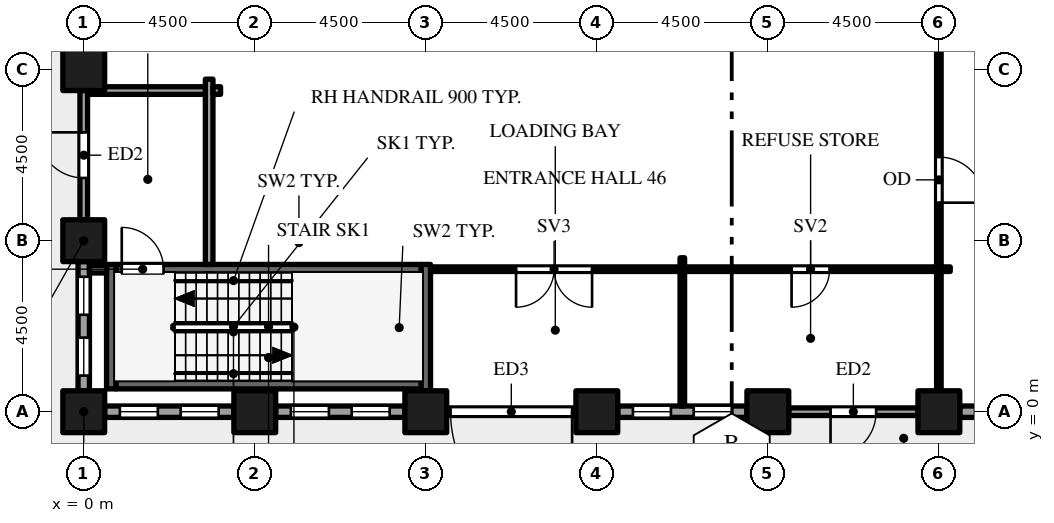
"""IFC4 building model, lengths in metres.
Left out: names, types, materials, properties, quantities, classifications, styles, units other than length and angle.
Written with IfcOpenShell. Run it as: python <this file> out.ifc"""

import sys

from ifc_helpers import new_model, si_unit, direction, frame, frame_2d, origin, origin_2d, place, context, subcontext, project, spatial, rectangle, hollow_rectangle, extrude, element, fill, save


model = new_model("IFC4")
c1 = context("Model", 3, precision=1e-05, world=origin(), true_north=direction((0.0, 1.0)))
c2 = subcontext(c1, "Body", "Model", "MODEL_VIEW")
j1 = project(units=[si_unit("LENGTHUNIT", "METRE"), si_unit("PLANEANGLEUNIT", "RADIAN")], contexts=[c1])
p1 = place(None, origin())
s1 = spatial("IfcSite", under=j1, at=p1, CompositionType="ELEMENT")
p2 = place(p1, origin())
s2 = spatial("IfcBuilding", under=s1, at=p2, CompositionType="ELEMENT")
p3 = place(p2, origin())
s3 = spatial("IfcBuildingStorey", under=s2, at=p3, CompositionType="ELEMENT", Elevation=0.0)
for number, where, z_axis, x_axis in (
    (1, (0.0, 0.0, -0.3), (0.0, 0.0, 1.0), (1.0, 0.0, 0.0)),
    (2, (0.0, 4.5, -0.3), (0.0, 0.0, 1.0), (1.0, 0.0, 0.0)),
    (3, (0.0, 9.0, -0.3), (0.0, 0.0, 1.0), (1.0, 0.0, 0.0)),
    (4, (4.5, 0.0, -0.3), (0.0, 0.0, 1.0), (1.0, 0.0, 0.0)),
    (5, (9.0, 0.0, -0.3), (0.0, 0.0, 1.0), (1.0, 0.0, 0.0)),
    (6, (13.5, 0.0, -0.3), (0.0, 0.0, 1.0), (1.0, 0.0, 0.0)),
    (7, (18.0, 0.0, -0.3), (0.0, 0.0, 1.0), (1.0, 0.0, 0.0)),
    (8, (22.5, 0.0, -0.3), (0.0, 0.0, 1.0), (1.0, 0.0, 0.0)),
):
    element("IfcColumn", number, at=place(p3, frame(where, z_axis=z_axis, x_axis=x_axis)), inside=s3, PredefinedType="COLUMN", context=c2, shape_type="SweptSolid", body=[
        extrude(hollow_rectangle(XDim=1.1, YDim=1.1, WallThickness=0.06, at=origin_2d()), origin(), (0.0, 0.0, 1.0), 8.05),
    ])
p4 = place(p3, frame((0.0, 5.05, 0.0), z_axis=(0.0, 0.0, 1.0), x_axis=(0.0, 1.0, 0.0)))
e9 = element("IfcWall", 9, at=p4, inside=s3, PredefinedType="STANDARD", context=c2, shape_type="SweptSolid", body=[
    extrude(rectangle(XDim=3.4, YDim=0.2, at=frame_2d((1.7, 0.0))), origin(), (0.0, 0.0, 1.0), 7.036),
])
p5 = place(p4, frame((1.1, 0.0, 0.0)))
e10 = element("IfcOpeningElement", 10, at=p5, cuts=e9, PredefinedType="OPENING", context=c2, shape_type="SweptSolid", body=[
    extrude(rectangle(XDim=1.2, YDim=2.4, at=frame_2d((0.6, 1.2))), frame((0.0, 0.11, 0.0), z_axis=(0.0, -1.0, 0.0), x_axis=(1.0, 0.0, 0.0)), (0.0, 0.0, 1.0), 0.22),
])
p6 = place(p3, frame((0.0, 3.95, 0.0), z_axis=(0.0, 0.0, 1.0), x_axis=(0.0, -1.0, 0.0)))
e11 = element("IfcWall", 11, at=p6, inside=s3, PredefinedType="STANDARD", context=c2, shape_type="SweptSolid", body=[
    extrude(rectangle(XDim=3.4, YDim=0.3, at=frame_2d((1.7, 0.0))), origin(), (0.0, 0.0, 1.0), 7.036),
])
p7 = place(p6, frame((0.4, 0.0, 0.9)))
e12 = element("IfcOpeningElement", 12, at=p7, cuts=e11, PredefinedType="OPENING", context=c2, shape_type="SweptSolid", body=[
    extrude(rectangle(XDim=1.0, YDim=3.5, at=frame_2d((0.5, 1.75))), frame((0.0, 0.16, 0.0), z_axis=(0.0, -1.0, 0.0), x_axis=(1.0, 0.0, 0.0)), (0.0, 0.0, 1.0), 0.32),
])
p8 = place(p6, frame((2.0, 0.0, 0.9)))
e13 = element("IfcOpeningElement", 13, at=p8, cuts=e11, PredefinedType="OPENING", context=c2, shape_type="SweptSolid", body=[
    extrude(rectangle(XDim=1.0, YDim=3.5, at=frame_2d((0.5, 1.75))), frame((0.0, 0.16, 0.0), z_axis=(0.0, -1.0, 0.0), x_axis=(1.0, 0.0, 0.0)), (0.0, 0.0, 1.0), 0.32),
])
p9 = place(p3, frame((0.55, 0.0, 0.0), z_axis=(0.0, 0.0, 1.0), x_axis=(1.0, 0.0, 0.0)))
e14 = element("IfcWall", 14, at=p9, inside=s3, PredefinedType="STANDARD", context=c2, shape_type="SweptSolid", body=[
    extrude(rectangle(XDim=3.4, YDim=0.3, at=frame_2d((1.7, 0.0))), origin(), (0.0, 0.0, 1.0), 7.036),
])
p10 = place(p9, frame((0.4, 0.0, 0.9)))
e15 = element("IfcOpeningElement", 15, at=p10, cuts=e14, PredefinedType="OPENING", context=c2, shape_type="SweptSolid", body=[
    extrude(rectangle(XDim=1.0, YDim=3.5, at=frame_2d((0.5, 1.75))), frame((0.0, 0.16, 0.0), z_axis=(0.0, -1.0, 0.0), x_axis=(1.0, 0.0, 0.0)), (0.0, 0.0, 1.0), 0.32),
])
p11 = place(p9, frame((2.0, 0.0, 0.9)))
e16 = element("IfcOpeningElement", 16, at=p11, cuts=e14, PredefinedType="OPENING", context=c2, shape_type="SweptSolid", body=[
    extrude(rectangle(XDim=1.0, YDim=3.5, at=frame_2d((0.5, 1.75))), frame((0.0, 0.16, 0.0), z_axis=(0.0, -1.0, 0.0), x_axis=(1.0, 0.0, 0.0)), (0.0, 0.0, 1.0), 0.32),
])
p12 = place(p3, frame((5.05, 0.0, 0.0), z_axis=(0.0, 0.0, 1.0), x_axis=(1.0, 0.0, 0.0)))
e17 = element("IfcWall", 17, at=p12, inside=s3, PredefinedType="STANDARD", context=c2, shape_type="SweptSolid", body=[
    extrude(rectangle(XDim=3.4, YDim=0.3, at=frame_2d((1.7, 0.0))), origin(), (0.0, 0.0, 1.0), 7.036),
])
p13 = place(p12, frame((0.4, 0.0, 0.9)))
e18 = element("IfcOpeningElement", 18, at=p13, cuts=e17, PredefinedType="OPENING", context=c2, shape_type="SweptSolid", body=[
    extrude(rectangle(XDim=1.0, YDim=3.5, at=frame_2d((0.5, 1.75))), frame((0.0, 0.16, 0.0), z_axis=(0.0, -1.0, 0.0), x_axis=(1.0, 0.0, 0.0)), (0.0, 0.0, 1.0), 0.32),
])
p14 = place(p12, frame((2.0, 0.0, 0.9)))
e19 = element("IfcOpeningElement", 19, at=p14, cuts=e17, PredefinedType="OPENING", context=c2, shape_type="SweptSolid", body=[
    extrude(rectangle(XDim=1.0, YDim=3.5, at=frame_2d((0.5, 1.75))), frame((0.0, 0.16, 0.0), z_axis=(0.0, -1.0, 0.0), x_axis=(1.0, 0.0, 0.0)), (0.0, 0.0, 1.0), 0.32),
])
p15 = place(p3, frame((12.95, 0.0, 0.0), z_axis=(0.0, 0.0, 1.0), x_axis=(-1.0, 0.0, 0.0)))
e20 = element("IfcWall", 20, at=p15, inside=s3, PredefinedType="STANDARD", context=c2, shape_type="SweptSolid", body=[
    extrude(rectangle(XDim=3.4, YDim=0.2, at=frame_2d((1.7, 0.0))), origin(), (0.0, 0.0, 1.0), 7.036),
])
p16 = place(p15, frame((0.1, 0.0, 0.0)))
e21 = element("IfcOpeningElement", 21, at=p16, cuts=e20, PredefinedType="OPENING", context=c2, shape_type="SweptSolid", body=[
    extrude(rectangle(XDim=3.2, YDim=4.5, at=frame_2d((1.6, 2.25))), frame((0.0, 0.11, 0.0), z_axis=(0.0, -1.0, 0.0), x_axis=(1.0, 0.0, 0.0)), (0.0, 0.0, 1.0), 0.22),
])
p17 = place(p3, frame((14.05, 0.0, 0.0), z_axis=(0.0, 0.0, 1.0), x_axis=(1.0, 0.0, 0.0)))
e22 = element("IfcWall", 22, at=p17, inside=s3, PredefinedType="STANDARD", context=c2, shape_type="SweptSolid", body=[
    extrude(rectangle(XDim=3.4, YDim=0.3, at=frame_2d((1.7, 0.0))), origin(), (0.0, 0.0, 1.0), 7.036),
])
p18 = place(p17, frame((0.4, 0.0, 0.9)))
e23 = element("IfcOpeningElement", 23, at=p18, cuts=e22, PredefinedType="OPENING", context=c2, shape_type="SweptSolid", body=[
    extrude(rectangle(XDim=1.0, YDim=3.5, at=frame_2d((0.5, 1.75))), frame((0.0, 0.16, 0.0), z_axis=(0.0, -1.0, 0.0), x_axis=(1.0, 0.0, 0.0)), (0.0, 0.0, 1.0), 0.32),
])
p19 = place(p17, frame((2.0, 0.0, 0.9)))
e24 = element("IfcOpeningElement", 24, at=p19, cuts=e22, PredefinedType="OPENING", context=c2, shape_type="SweptSolid", body=[
    extrude(rectangle(XDim=1.0, YDim=3.5, at=frame_2d((0.5, 1.75))), frame((0.0, 0.16, 0.0), z_axis=(0.0, -1.0, 0.0), x_axis=(1.0, 0.0, 0.0)), (0.0, 0.0, 1.0), 0.32),
])
p20 = place(p3, frame((21.95, 0.0, 0.0), z_axis=(0.0, 0.0, 1.0), x_axis=(-1.0, 0.0, 0.0)))
e25 = element("IfcWall", 25, at=p20, inside=s3, PredefinedType="STANDARD", context=c2, shape_type="SweptSolid", body=[
    extrude(rectangle(XDim=3.4, YDim=0.2, at=frame_2d((1.7, 0.0))), origin(), (0.0, 0.0, 1.0), 7.036),
])
p21 = place(p20, frame((1.1, 0.0, 0.0)))
e26 = element("IfcOpeningElement", 26, at=p21, cuts=e25, PredefinedType="OPENING", context=c2, shape_type="SweptSolid", body=[
    extrude(rectangle(XDim=1.2, YDim=2.4, at=frame_2d((0.6, 1.2))), frame((0.0, 0.11, 0.0), z_axis=(0.0, -1.0, 0.0), x_axis=(1.0, 0.0, 0.0)), (0.0, 0.0, 1.0), 0.22),
])
p22 = place(p3, frame((23.05, 0.0, 0.0), z_axis=(0.0, 0.0, 1.0), x_axis=(1.0, 0.0, 0.0)))
e27 = element("IfcWall", 27, at=p22, inside=s3, PredefinedType="STANDARD", context=c2, shape_type="SweptSolid", body=[
    extrude(rectangle(XDim=3.4, YDim=0.3, at=frame_2d((1.7, 0.0))), origin(), (0.0, 0.0, 1.0), 7.036),
])
p23 = place(p22, frame((0.4, 0.0, 0.9)))
e28 = element("IfcOpeningElement", 28, at=p23, cuts=e27, PredefinedType="OPENING", context=c2, shape_type="SweptSolid", body=[
    extrude(rectangle(XDim=1.0, YDim=3.5, at=frame_2d((0.5, 1.75))), frame((0.0, 0.16, 0.0), z_axis=(0.0, -1.0, 0.0), x_axis=(1.0, 0.0, 0.0)), (0.0, 0.0, 1.0), 0.32),
])
p24 = place(p22, frame((2.0, 0.0, 0.9)))
e29 = element("IfcOpeningElement", 29, at=p24, cuts=e27, PredefinedType="OPENING", context=c2, shape_type="SweptSolid", body=[
    extrude(rectangle(XDim=1.0, YDim=3.5, at=frame_2d((0.5, 1.75))), frame((0.0, 0.16, 0.0), z_axis=(0.0, -1.0, 0.0), x_axis=(1.0, 0.0, 0.0)), (0.0, 0.0, 1.0), 0.32),
])
p25 = place(p3, frame((0.725, 0.6, 0.0), z_axis=(0.0, 0.0, 1.0), x_axis=(0.0, 1.0, 0.0)))
e30 = element("IfcWall", 30, at=p25, inside=s3, PredefinedType="SHEAR", context=c2, shape_type="SweptSolid", body=[
    extrude(rectangle(XDim=3.275, YDim=0.25, at=frame_2d((1.637, 0.0))), origin(), (0.0, 0.0, 1.0), 7.75),
])
p26 = place(p3, frame((3.3, 3.45, 0.0), z_axis=(0.0, 0.0, 1.0), x_axis=(0.0, 1.0, 0.0)))
e31 = element("IfcWall", 31, at=p26, inside=s3, PredefinedType="PARTITIONING", context=c2, shape_type="SweptSolid", body=[
    extrude(rectangle(XDim=0.175, YDim=0.2, at=frame_2d((0.087, 0.0))), origin(), (0.0, 0.0, 1.0), 7.75),
])
p27 = place(p3, frame((3.3, 3.875, 0.0), z_axis=(0.0, 0.0, 1.0), x_axis=(0.0, 1.0, 0.0)))
e32 = element("IfcWall", 32, at=p27, inside=s3, PredefinedType="PARTITIONING", context=c2, shape_type="SweptSolid", body=[
    extrude(rectangle(XDim=4.875, YDim=0.2, at=frame_2d((2.438, 0.0))), origin(), (0.0, 0.0, 1.0), 7.75),
])
p28 = place(p3, frame((9.0, 0.15, 0.0), z_axis=(0.0, 0.0, 1.0), x_axis=(0.0, 1.0, 0.0)))
e33 = element("IfcWall", 33, at=p28, inside=s3, PredefinedType="PARTITIONING", context=c2, shape_type="SweptSolid", body=[
    extrude(rectangle(XDim=0.4, YDim=0.12, at=frame_2d((0.2, 0.0))), origin(), (0.0, 0.0, 1.0), 7.75),
])
p29 = place(p3, frame((9.0, 0.55, 0.0), z_axis=(0.0, 0.0, 1.0), x_axis=(0.0, 1.0, 0.0)))
e34 = element("IfcWall", 34, at=p29, inside=s3, PredefinedType="SHEAR", context=c2, shape_type="SweptSolid", body=[
    extrude(rectangle(XDim=3.325, YDim=0.25, at=frame_2d((1.663, 0.0))), origin(), (0.0, 0.0, 1.0), 7.75),
])
p30 = place(p3, frame((15.75, 0.15, 0.0), z_axis=(0.0, 0.0, 1.0), x_axis=(0.0, 1.0, 0.0)))
e35 = element("IfcWall", 35, at=p30, inside=s3, PredefinedType="PARTITIONING", context=c2, shape_type="SweptSolid", body=[
    extrude(rectangle(XDim=3.9, YDim=0.12, at=frame_2d((1.95, 0.0))), origin(), (0.0, 0.0, 1.0), 6.759),
])
p31 = place(p3, frame((22.5, 0.15, 0.0), z_axis=(0.0, 0.0, 1.0), x_axis=(0.0, 1.0, 0.0)))
e36 = element("IfcWall", 36, at=p31, inside=s3, PredefinedType="PARTITIONING", context=c2, shape_type="SweptSolid", body=[
    extrude(rectangle(XDim=32.85, YDim=0.12, at=frame_2d((16.425, 0.0))), origin(), (0.0, 0.0, 1.0), 6.759),
])
p32 = place(p31, frame((5.35, 0.0, 0.0)))
e37 = element("IfcOpeningElement", 37, at=p32, cuts=e36, PredefinedType="OPENING", context=c2, shape_type="SweptSolid", body=[
    extrude(rectangle(XDim=1.2, YDim=2.1, at=frame_2d((0.6, 1.05))), frame((0.0, 0.07, 0.0), z_axis=(0.0, -1.0, 0.0), x_axis=(1.0, 0.0, 0.0)), (0.0, 0.0, 1.0), 0.14),
])
p33 = place(p31, frame((16.155, 0.0, 0.0)))
e38 = element("IfcOpeningElement", 38, at=p33, cuts=e36, PredefinedType="OPENING", context=c2, shape_type="SweptSolid", body=[
    extrude(rectangle(XDim=1.2, YDim=2.1, at=frame_2d((0.6, 1.05))), frame((0.0, 0.07, 0.0), z_axis=(0.0, -1.0, 0.0), x_axis=(1.0, 0.0, 0.0)), (0.0, 0.0, 1.0), 0.14),
])
p34 = place(p31, frame((30.15, 0.0, 0.0)))
e39 = element("IfcOpeningElement", 39, at=p34, cuts=e36, PredefinedType="OPENING", context=c2, shape_type="SweptSolid", body=[
    extrude(rectangle(XDim=1.8, YDim=2.1, at=frame_2d((0.9, 1.05))), frame((0.0, 0.07, 0.0), z_axis=(0.0, -1.0, 0.0), x_axis=(1.0, 0.0, 0.0)), (0.0, 0.0, 1.0), 0.14),
])
p35 = place(p3, frame((0.85, 0.725, 0.0), z_axis=(0.0, 0.0, 1.0), x_axis=(1.0, 0.0, 0.0)))
e40 = element("IfcWall", 40, at=p35, inside=s3, PredefinedType="SHEAR", context=c2, shape_type="SweptSolid", body=[
    extrude(rectangle(XDim=8.025, YDim=0.25, at=frame_2d((4.012, 0.0))), origin(), (0.0, 0.0, 1.0), 7.75),
])
p36 = place(p3, frame((0.15, 3.75, 0.0), z_axis=(0.0, 0.0, 1.0), x_axis=(1.0, 0.0, 0.0)))
e41 = element("IfcWall", 41, at=p36, inside=s3, PredefinedType="PARTITIONING", context=c2, shape_type="SweptSolid", body=[
    extrude(rectangle(XDim=0.45, YDim=0.2, at=frame_2d((0.225, 0.0))), origin(), (0.0, 0.0, 1.0), 7.036),
])
p37 = place(p3, frame((0.85, 3.75, 0.0), z_axis=(0.0, 0.0, 1.0), x_axis=(1.0, 0.0, 0.0)))
e42 = element("IfcWall", 42, at=p37, inside=s3, PredefinedType="SHEAR", context=c2, shape_type="SweptSolid", body=[
    extrude(rectangle(XDim=8.025, YDim=0.25, at=frame_2d((4.012, 0.0))), origin(), (0.0, 0.0, 1.0), 7.75),
])
p38 = place(p37, frame((0.15, 0.0, 0.0)))
e43 = element("IfcOpeningElement", 43, at=p38, cuts=e42, PredefinedType="OPENING", context=c2, shape_type="SweptSolid", body=[
    extrude(rectangle(XDim=1.1, YDim=2.1, at=frame_2d((0.55, 1.05))), frame((0.0, 0.135, 0.0), z_axis=(0.0, -1.0, 0.0), x_axis=(1.0, 0.0, 0.0)), (0.0, 0.0, 1.0), 0.27),
])
p39 = place(p3, frame((9.125, 3.75, 0.0), z_axis=(0.0, 0.0, 1.0), x_axis=(1.0, 0.0, 0.0)))
e44 = element("IfcWall", 44, at=p39, inside=s3, PredefinedType="PARTITIONING", context=c2, shape_type="SweptSolid", body=[
    extrude(rectangle(XDim=6.565, YDim=0.12, at=frame_2d((3.282, 0.0))), origin(), (0.0, 0.0, 1.0), 6.759),
])
p40 = place(p39, frame((2.25, 0.0, 0.0)))
e45 = element("IfcOpeningElement", 45, at=p40, cuts=e44, PredefinedType="OPENING", context=c2, shape_type="SweptSolid", body=[
    extrude(rectangle(XDim=2.0, YDim=2.1, at=frame_2d((1.0, 1.05))), frame((0.0, 0.07, 0.0), z_axis=(0.0, -1.0, 0.0), x_axis=(1.0, 0.0, 0.0)), (0.0, 0.0, 1.0), 0.14),
])
p41 = place(p3, frame((15.81, 3.75, 0.0), z_axis=(0.0, 0.0, 1.0), x_axis=(1.0, 0.0, 0.0)))
e46 = element("IfcWall", 46, at=p41, inside=s3, PredefinedType="PARTITIONING", context=c2, shape_type="SweptSolid", body=[
    extrude(rectangle(XDim=6.63, YDim=0.12, at=frame_2d((3.315, 0.0))), origin(), (0.0, 0.0, 1.0), 6.759),
])
p42 = place(p41, frame((2.815, 0.0, 0.0)))
e47 = element("IfcOpeningElement", 47, at=p42, cuts=e46, PredefinedType="OPENING", context=c2, shape_type="SweptSolid", body=[
    extrude(rectangle(XDim=1.0, YDim=2.1, at=frame_2d((0.5, 1.05))), frame((0.0, 0.07, 0.0), z_axis=(0.0, -1.0, 0.0), x_axis=(1.0, 0.0, 0.0)), (0.0, 0.0, 1.0), 0.14),
])
p43 = place(p3, frame((22.56, 3.75, 0.0), z_axis=(0.0, 0.0, 1.0), x_axis=(1.0, 0.0, 0.0)))
e48 = element("IfcWall", 48, at=p43, inside=s3, PredefinedType="PARTITIONING", context=c2, shape_type="SweptSolid", body=[
    extrude(rectangle(XDim=0.24, YDim=0.12, at=frame_2d((0.12, 0.0))), origin(), (0.0, 0.0, 1.0), 6.759),
])
p44 = place(p3, frame((0.15, 8.45, 0.0), z_axis=(0.0, 0.0, 1.0), x_axis=(1.0, 0.0, 0.0)))
e49 = element("IfcWall", 49, at=p44, inside=s3, PredefinedType="PARTITIONING", context=c2, shape_type="SweptSolid", body=[
    extrude(rectangle(XDim=3.05, YDim=0.2, at=frame_2d((1.525, 0.0))), origin(), (0.0, 0.0, 1.0), 6.759),
])
p45 = place(p3, frame((3.4, 8.45, 0.0), z_axis=(0.0, 0.0, 1.0), x_axis=(1.0, 0.0, 0.0)))
e50 = element("IfcWall", 50, at=p45, inside=s3, PredefinedType="PARTITIONING", context=c2, shape_type="SweptSolid", body=[
    extrude(rectangle(XDim=0.2, YDim=0.2, at=frame_2d((0.1, 0.0))), origin(), (0.0, 0.0, 1.0), 7.75),
])
p46 = place(p5, origin())
e51 = element("IfcDoor", 51, at=p46, inside=s3, OperationType="SINGLE_SWING_RIGHT", PredefinedType="DOOR", context=c2, shape_type="SweptSolid", body=[
    extrude(rectangle(XDim=1.2, YDim=2.4, at=frame_2d((0.6, 1.2))), frame((0.0, 0.025, 0.0), z_axis=(0.0, -1.0, 0.0), x_axis=(1.0, 0.0, 0.0)), (0.0, 0.0, 1.0), 0.05),
])
fill(e10, e51)
p47 = place(p7, origin())
e52 = element("IfcWindow", 52, at=p47, inside=s3, PartitioningType="SINGLE_PANEL", PredefinedType="WINDOW", context=c2, shape_type="SweptSolid", body=[
    extrude(rectangle(XDim=1.0, YDim=3.5, at=frame_2d((0.5, 1.75))), frame((0.0, 0.03, 0.0), z_axis=(0.0, -1.0, 0.0), x_axis=(1.0, 0.0, 0.0)), (0.0, 0.0, 1.0), 0.06),
])
fill(e12, e52)
p48 = place(p8, origin())
e53 = element("IfcWindow", 53, at=p48, inside=s3, PartitioningType="SINGLE_PANEL", PredefinedType="WINDOW", context=c2, shape_type="SweptSolid", body=[
    extrude(rectangle(XDim=1.0, YDim=3.5, at=frame_2d((0.5, 1.75))), frame((0.0, 0.03, 0.0), z_axis=(0.0, -1.0, 0.0), x_axis=(1.0, 0.0, 0.0)), (0.0, 0.0, 1.0), 0.06),
])
fill(e13, e53)
p49 = place(p10, origin())
e54 = element("IfcWindow", 54, at=p49, inside=s3, PartitioningType="SINGLE_PANEL", PredefinedType="WINDOW", context=c2, shape_type="SweptSolid", body=[
    extrude(rectangle(XDim=1.0, YDim=3.5, at=frame_2d((0.5, 1.75))), frame((0.0, 0.03, 0.0), z_axis=(0.0, -1.0, 0.0), x_axis=(1.0, 0.0, 0.0)), (0.0, 0.0, 1.0), 0.06),
])
fill(e15, e54)
p50 = place(p11, origin())
e55 = element("IfcWindow", 55, at=p50, inside=s3, PartitioningType="SINGLE_PANEL", PredefinedType="WINDOW", context=c2, shape_type="SweptSolid", body=[
    extrude(rectangle(XDim=1.0, YDim=3.5, at=frame_2d((0.5, 1.75))), frame((0.0, 0.03, 0.0), z_axis=(0.0, -1.0, 0.0), x_axis=(1.0, 0.0, 0.0)), (0.0, 0.0, 1.0), 0.06),
])
fill(e16, e55)
p51 = place(p13, origin())
e56 = element("IfcWindow", 56, at=p51, inside=s3, PartitioningType="SINGLE_PANEL", PredefinedType="WINDOW", context=c2, shape_type="SweptSolid", body=[
    extrude(rectangle(XDim=1.0, YDim=3.5, at=frame_2d((0.5, 1.75))), frame((0.0, 0.03, 0.0), z_axis=(0.0, -1.0, 0.0), x_axis=(1.0, 0.0, 0.0)), (0.0, 0.0, 1.0), 0.06),
])
fill(e18, e56)
p52 = place(p14, origin())
e57 = element("IfcWindow", 57, at=p52, inside=s3, PartitioningType="SINGLE_PANEL", PredefinedType="WINDOW", context=c2, shape_type="SweptSolid", body=[
    extrude(rectangle(XDim=1.0, YDim=3.5, at=frame_2d((0.5, 1.75))), frame((0.0, 0.03, 0.0), z_axis=(0.0, -1.0, 0.0), x_axis=(1.0, 0.0, 0.0)), (0.0, 0.0, 1.0), 0.06),
])
fill(e19, e57)
p53 = place(p16, origin())
e58 = element("IfcDoor", 58, at=p53, inside=s3, OperationType="ROLLINGUP", PredefinedType="GATE", context=c2, shape_type="SweptSolid", body=[
    extrude(rectangle(XDim=3.2, YDim=4.5, at=frame_2d((1.6, 2.25))), frame((0.0, 0.025, 0.0), z_axis=(0.0, -1.0, 0.0), x_axis=(1.0, 0.0, 0.0)), (0.0, 0.0, 1.0), 0.05),
])
fill(e21, e58)
p54 = place(p18, origin())
e59 = element("IfcWindow", 59, at=p54, inside=s3, PartitioningType="SINGLE_PANEL", PredefinedType="WINDOW", context=c2, shape_type="SweptSolid", body=[
    extrude(rectangle(XDim=1.0, YDim=3.5, at=frame_2d((0.5, 1.75))), frame((0.0, 0.03, 0.0), z_axis=(0.0, -1.0, 0.0), x_axis=(1.0, 0.0, 0.0)), (0.0, 0.0, 1.0), 0.06),
])
fill(e23, e59)
p55 = place(p19, origin())
e60 = element("IfcWindow", 60, at=p55, inside=s3, PartitioningType="SINGLE_PANEL", PredefinedType="WINDOW", context=c2, shape_type="SweptSolid", body=[
    extrude(rectangle(XDim=1.0, YDim=3.5, at=frame_2d((0.5, 1.75))), frame((0.0, 0.03, 0.0), z_axis=(0.0, -1.0, 0.0), x_axis=(1.0, 0.0, 0.0)), (0.0, 0.0, 1.0), 0.06),
])
fill(e24, e60)
p56 = place(p21, origin())
e61 = element("IfcDoor", 61, at=p56, inside=s3, OperationType="SINGLE_SWING_RIGHT", PredefinedType="DOOR", context=c2, shape_type="SweptSolid", body=[
    extrude(rectangle(XDim=1.2, YDim=2.4, at=frame_2d((0.6, 1.2))), frame((0.0, 0.025, 0.0), z_axis=(0.0, -1.0, 0.0), x_axis=(1.0, 0.0, 0.0)), (0.0, 0.0, 1.0), 0.05),
])
fill(e26, e61)
p57 = place(p38, origin())
e62 = element("IfcDoor", 62, at=p57, inside=s3, OperationType="SINGLE_SWING_LEFT", PredefinedType="DOOR", context=c2, shape_type="SweptSolid", body=[
    extrude(rectangle(XDim=1.1, YDim=2.1, at=frame_2d((0.55, 1.05))), frame((0.0, 0.025, 0.0), z_axis=(0.0, -1.0, 0.0), x_axis=(1.0, 0.0, 0.0)), (0.0, 0.0, 1.0), 0.05),
])
fill(e43, e62)
p58 = place(p40, origin())
e63 = element("IfcDoor", 63, at=p58, inside=s3, OperationType="DOUBLE_DOOR_SINGLE_SWING", PredefinedType="DOOR", context=c2, shape_type="SweptSolid", body=[
    extrude(rectangle(XDim=2.0, YDim=2.1, at=frame_2d((1.0, 1.05))), frame((0.0, 0.025, 0.0), z_axis=(0.0, -1.0, 0.0), x_axis=(1.0, 0.0, 0.0)), (0.0, 0.0, 1.0), 0.05),
])
fill(e45, e63)
p59 = place(p42, origin())
e64 = element("IfcDoor", 64, at=p59, inside=s3, OperationType="SINGLE_SWING_LEFT", PredefinedType="DOOR", context=c2, shape_type="SweptSolid", body=[
    extrude(rectangle(XDim=1.0, YDim=2.1, at=frame_2d((0.5, 1.05))), frame((0.0, 0.025, 0.0), z_axis=(0.0, -1.0, 0.0), x_axis=(1.0, 0.0, 0.0)), (0.0, 0.0, 1.0), 0.05),
])
fill(e47, e64)
p60 = place(p32, origin())
e65 = element("IfcDoor", 65, at=p60, inside=s3, OperationType="SINGLE_SWING_LEFT", PredefinedType="DOOR", context=c2, shape_type="SweptSolid", body=[
    extrude(rectangle(XDim=1.2, YDim=2.1, at=frame_2d((0.6, 1.05))), frame((0.0, 0.025, 0.0), z_axis=(0.0, -1.0, 0.0), x_axis=(1.0, 0.0, 0.0)), (0.0, 0.0, 1.0), 0.05),
])
fill(e37, e65)
save(model, sys.argv[1])
